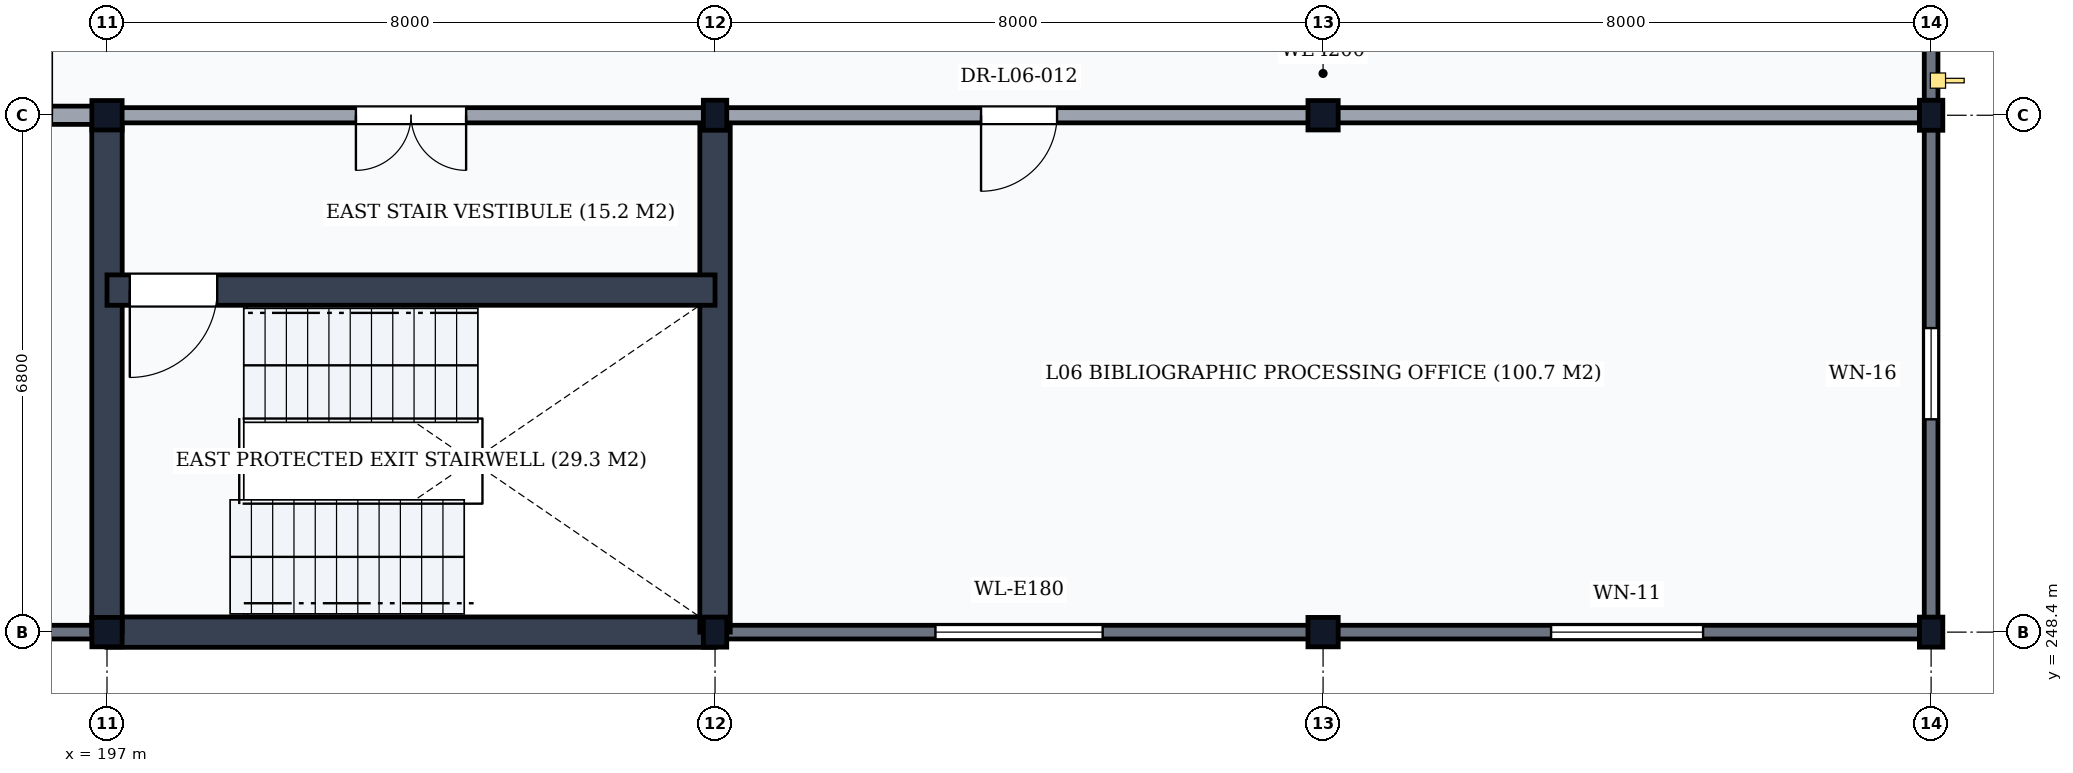
"""IFC4 building model, lengths in metres.
Left out: names, types, materials, properties, quantities, classifications, styles, units other than length and angle.
Written with IfcOpenShell. Run it as: python <this file> out.ifc"""

import sys

from ifc_helpers import new_model, si_unit, direction, frame, frame_2d, origin, origin_2d, place, context, subcontext, project, spatial, rectangle, i_section, extrude, element, fill, save


model = new_model("IFC4")
c1 = context("Model", 3, precision=1e-05, world=origin(), true_north=direction((0.0, 1.0)))
c2 = subcontext(c1, "Body", "Model", "MODEL_VIEW")
j1 = project(units=[si_unit("LENGTHUNIT", "METRE"), si_unit("PLANEANGLEUNIT", "RADIAN")], contexts=[c1])
p1 = place(None, origin())
s1 = spatial("IfcSite", under=j1, at=p1, CompositionType="ELEMENT")
p2 = place(p1, origin())
s2 = spatial("IfcBuilding", under=s1, at=p2, CompositionType="ELEMENT")
p3 = place(p2, frame((0.0, 0.0, 24.3)))
s3 = spatial("IfcBuildingStorey", under=s2, at=p3, CompositionType="ELEMENT", Elevation=24.3)
for number, where, z_axis, x_axis in (
    (1, (197.0, 248.4, 0.0), (0.0, 0.0, 1.0), (1.0, 0.0, 0.0)),
    (2, (197.0, 255.2, 0.0), (0.0, 0.0, 1.0), (1.0, 0.0, 0.0)),
):
    element("IfcColumn", number, at=place(p3, frame(where, z_axis=z_axis, x_axis=x_axis)), inside=s3, PredefinedType="COLUMN", context=c2, shape_type="SweptSolid", body=[
        extrude(i_section(OverallWidth=0.398, OverallDepth=0.387, WebThickness=0.021, FlangeThickness=0.033, FilletRadius=0.015, at=origin_2d()), origin(), (0.0, 0.0, 1.0), 3.9),
    ])
for number, where, z_axis, x_axis in (
    (3, (205.0, 248.4, 0.0), (0.0, 0.0, 1.0), (1.0, 0.0, 0.0)),
    (4, (205.0, 255.2, 0.0), (0.0, 0.0, 1.0), (1.0, 0.0, 0.0)),
):
    element("IfcColumn", number, at=place(p3, frame(where, z_axis=z_axis, x_axis=x_axis)), inside=s3, PredefinedType="COLUMN", context=c2, shape_type="SweptSolid", body=[
        extrude(i_section(OverallWidth=0.308, OverallDepth=0.395, WebThickness=0.021, FlangeThickness=0.04, FilletRadius=0.027, at=origin_2d()), origin(), (0.0, 0.0, 1.0), 3.9),
    ])
for number, where, z_axis, x_axis in (
    (5, (213.0, 248.4, 0.0), (0.0, 0.0, 1.0), (1.0, 0.0, 0.0)),
    (6, (213.0, 255.2, 0.0), (0.0, 0.0, 1.0), (1.0, 0.0, 0.0)),
):
    element("IfcColumn", number, at=place(p3, frame(where, z_axis=z_axis, x_axis=x_axis)), inside=s3, PredefinedType="COLUMN", context=c2, shape_type="SweptSolid", body=[
        extrude(i_section(OverallWidth=0.398, OverallDepth=0.387, WebThickness=0.021, FlangeThickness=0.033, FilletRadius=0.015, at=origin_2d()), origin(), (0.0, 0.0, 1.0), 3.9),
    ])
for number, where, z_axis, x_axis in (
    (7, (221.0, 248.4, 0.0), (0.0, 0.0, 1.0), (1.0, 0.0, 0.0)),
    (8, (221.0, 255.2, 0.0), (0.0, 0.0, 1.0), (1.0, 0.0, 0.0)),
):
    element("IfcColumn", number, at=place(p3, frame(where, z_axis=z_axis, x_axis=x_axis)), inside=s3, PredefinedType="COLUMN", context=c2, shape_type="SweptSolid", body=[
        extrude(i_section(OverallWidth=0.308, OverallDepth=0.395, WebThickness=0.021, FlangeThickness=0.04, FilletRadius=0.027, at=origin_2d()), origin(), (0.0, 0.0, 1.0), 3.9),
    ])
p4 = place(p3, frame((189.006, 248.4, 0.0), z_axis=(0.0, 0.0, 1.0), x_axis=(1.0, 0.0, 0.0)))
e9 = element("IfcWall", 9, at=p4, inside=s3, PredefinedType="SOLIDWALL", context=c2, shape_type="SweptSolid", body=[
    extrude(rectangle(XDim=7.988, YDim=0.18, at=frame_2d((3.994, 0.0))), origin(), (0.0, 0.0, 1.0), 3.348),
])
p5 = place(p3, frame((205.006, 248.4, 0.0), z_axis=(0.0, 0.0, 1.0), x_axis=(1.0, 0.0, 0.0)))
e10 = element("IfcWall", 10, at=p5, inside=s3, PredefinedType="SOLIDWALL", context=c2, shape_type="SweptSolid", body=[
    extrude(rectangle(XDim=7.988, YDim=0.18, at=frame_2d((3.994, 0.0))), origin(), (0.0, 0.0, 1.0), 3.348),
])
p6 = place(p5, frame((2.894, 0.0, 0.95)))
e11 = element("IfcOpeningElement", 11, at=p6, cuts=e10, PredefinedType="OPENING", context=c2, shape_type="SweptSolid", body=[
    extrude(rectangle(XDim=2.2, YDim=2.1, at=frame_2d((1.1, 1.05))), frame((0.0, 0.105, 0.0), z_axis=(0.0, -1.0, 0.0), x_axis=(1.0, 0.0, 0.0)), (0.0, 0.0, 1.0), 0.21),
])
p7 = place(p3, frame((213.006, 248.4, 0.0), z_axis=(0.0, 0.0, 1.0), x_axis=(1.0, 0.0, 0.0)))
e12 = element("IfcWall", 12, at=p7, inside=s3, PredefinedType="SOLIDWALL", context=c2, shape_type="SweptSolid", body=[
    extrude(rectangle(XDim=7.988, YDim=0.18, at=frame_2d((3.994, 0.0))), origin(), (0.0, 0.0, 1.0), 3.348),
])
p8 = place(p7, frame((2.994, 0.0, 0.95)))
e13 = element("IfcOpeningElement", 13, at=p8, cuts=e12, PredefinedType="OPENING", context=c2, shape_type="SweptSolid", body=[
    extrude(rectangle(XDim=2.0, YDim=2.1, at=frame_2d((1.0, 1.05))), frame((0.0, 0.105, 0.0), z_axis=(0.0, -1.0, 0.0), x_axis=(1.0, 0.0, 0.0)), (0.0, 0.0, 1.0), 0.21),
])
p9 = place(p3, frame((221.0, 248.406, 0.0), z_axis=(0.0, 0.0, 1.0), x_axis=(0.0, 1.0, 0.0)))
e14 = element("IfcWall", 14, at=p9, inside=s3, PredefinedType="SOLIDWALL", context=c2, shape_type="SweptSolid", body=[
    extrude(rectangle(XDim=6.788, YDim=0.18, at=frame_2d((3.394, 0.0))), origin(), (0.0, 0.0, 1.0), 3.428),
])
p10 = place(p9, frame((2.794, 0.0, 0.95)))
e15 = element("IfcOpeningElement", 15, at=p10, cuts=e14, PredefinedType="OPENING", context=c2, shape_type="SweptSolid", body=[
    extrude(rectangle(XDim=1.2, YDim=1.8, at=frame_2d((0.6, 0.9))), frame((0.0, 0.105, 0.0), z_axis=(0.0, -1.0, 0.0), x_axis=(1.0, 0.0, 0.0)), (0.0, 0.0, 1.0), 0.21),
])
p11 = place(p3, frame((221.0, 255.206, 0.0), z_axis=(0.0, 0.0, 1.0), x_axis=(0.0, 1.0, 0.0)))
e16 = element("IfcWall", 16, at=p11, inside=s3, PredefinedType="SOLIDWALL", context=c2, shape_type="SweptSolid", body=[
    extrude(rectangle(XDim=7.588, YDim=0.18, at=frame_2d((3.794, 0.0))), origin(), (0.0, 0.0, 1.0), 3.388),
])
p12 = place(p11, frame((3.866, 0.0, 0.95)))
e17 = element("IfcOpeningElement", 17, at=p12, cuts=e16, PredefinedType="OPENING", context=c2, shape_type="SweptSolid", body=[
    extrude(rectangle(XDim=2.4, YDim=2.2, at=frame_2d((1.2, 1.1))), frame((0.0, 0.105, 0.0), z_axis=(0.0, -1.0, 0.0), x_axis=(1.0, 0.0, 0.0)), (0.0, 0.0, 1.0), 0.21),
])
p13 = place(p3, frame((197.0, 248.4, 0.0), z_axis=(0.0, 0.0, 1.0), x_axis=(1.0, 0.0, 0.0)))
e18 = element("IfcWall", 18, at=p13, inside=s3, PredefinedType="SHEAR", context=c2, shape_type="SweptSolid", body=[
    extrude(rectangle(XDim=8.0, YDim=0.4, at=frame_2d((4.0, 0.0))), origin(), (0.0, 0.0, 1.0), 3.66),
])
for number, where, z_axis, x_axis in (
    (19, (197.0, 248.4, 0.0), (0.0, 0.0, 1.0), (0.0, 1.0, 0.0)),
    (20, (205.0, 248.4, 0.0), (0.0, 0.0, 1.0), (0.0, 1.0, 0.0)),
):
    element("IfcWall", number, at=place(p3, frame(where, z_axis=z_axis, x_axis=x_axis)), inside=s3, PredefinedType="SHEAR", context=c2, shape_type="SweptSolid", body=[
        extrude(rectangle(XDim=6.8, YDim=0.4, at=frame_2d((3.4, 0.0))), origin(), (0.0, 0.0, 1.0), 3.66),
    ])
p14 = place(p3, frame((197.0, 252.9, 0.0), z_axis=(0.0, 0.0, 1.0), x_axis=(1.0, 0.0, 0.0)))
e21 = element("IfcWall", 21, at=p14, inside=s3, PredefinedType="SHEAR", context=c2, shape_type="SweptSolid", body=[
    extrude(rectangle(XDim=8.0, YDim=0.4, at=frame_2d((4.0, 0.0))), origin(), (0.0, 0.0, 1.0), 3.66),
])
p15 = place(p14, frame((0.3, 0.0, 0.0)))
e22 = element("IfcOpeningElement", 22, at=p15, cuts=e21, PredefinedType="OPENING", context=c2, shape_type="SweptSolid", body=[
    extrude(rectangle(XDim=1.15, YDim=2.15, at=frame_2d((0.575, 1.075))), frame((0.0, 0.215, 0.0), z_axis=(0.0, -1.0, 0.0), x_axis=(1.0, 0.0, 0.0)), (0.0, 0.0, 1.0), 0.43),
])
p16 = place(p3, frame((197.0, 255.2, 0.0), z_axis=(0.0, 0.0, 1.0), x_axis=(1.0, 0.0, 0.0)))
e23 = element("IfcWall", 23, at=p16, inside=s3, PredefinedType="PARTITIONING", context=c2, shape_type="SweptSolid", body=[
    extrude(rectangle(XDim=8.0, YDim=0.2, at=frame_2d((4.0, 0.0))), origin(), (0.0, 0.0, 1.0), 3.058),
])
p17 = place(p16, frame((3.275, 0.0, 0.0)))
e24 = element("IfcOpeningElement", 24, at=p17, cuts=e23, PredefinedType="OPENING", context=c2, shape_type="SweptSolid", body=[
    extrude(rectangle(XDim=1.45, YDim=2.2, at=frame_2d((0.725, 1.1))), frame((0.0, 0.115, 0.0), z_axis=(0.0, -1.0, 0.0), x_axis=(1.0, 0.0, 0.0)), (0.0, 0.0, 1.0), 0.23),
])
p18 = place(p3, frame((189.0, 255.2, 0.0), z_axis=(0.0, 0.0, 1.0), x_axis=(1.0, 0.0, 0.0)))
e25 = element("IfcWall", 25, at=p18, inside=s3, PredefinedType="PARTITIONING", context=c2, shape_type="SweptSolid", body=[
    extrude(rectangle(XDim=8.0, YDim=0.24, at=frame_2d((4.0, 0.0))), origin(), (0.0, 0.0, 1.0), 3.058),
])
p19 = place(p18, frame((1.05, 0.0, 0.0)))
e26 = element("IfcOpeningElement", 26, at=p19, cuts=e25, PredefinedType="OPENING", context=c2, shape_type="SweptSolid", body=[
    extrude(rectangle(XDim=1.0, YDim=2.1, at=frame_2d((0.5, 1.05))), frame((0.0, 0.135, 0.0), z_axis=(0.0, -1.0, 0.0), x_axis=(1.0, 0.0, 0.0)), (0.0, 0.0, 1.0), 0.27),
])
p20 = place(p18, frame((3.6, 0.0, 0.0)))
e27 = element("IfcOpeningElement", 27, at=p20, cuts=e25, PredefinedType="OPENING", context=c2, shape_type="SweptSolid", body=[
    extrude(rectangle(XDim=1.5, YDim=2.25, at=frame_2d((0.75, 1.125))), frame((0.0, 0.135, 0.0), z_axis=(0.0, -1.0, 0.0), x_axis=(1.0, 0.0, 0.0)), (0.0, 0.0, 1.0), 0.27),
])
p21 = place(p18, frame((6.425, 0.0, 0.0)))
e28 = element("IfcOpeningElement", 28, at=p21, cuts=e25, PredefinedType="OPENING", context=c2, shape_type="SweptSolid", body=[
    extrude(rectangle(XDim=0.85, YDim=2.1, at=frame_2d((0.425, 1.05))), frame((0.0, 0.135, 0.0), z_axis=(0.0, -1.0, 0.0), x_axis=(1.0, 0.0, 0.0)), (0.0, 0.0, 1.0), 0.27),
])
p22 = place(p3, frame((205.0, 255.2, 0.0), z_axis=(0.0, 0.0, 1.0), x_axis=(1.0, 0.0, 0.0)))
e29 = element("IfcWall", 29, at=p22, inside=s3, PredefinedType="PARTITIONING", context=c2, shape_type="SweptSolid", body=[
    extrude(rectangle(XDim=16.0, YDim=0.2, at=frame_2d((8.0, 0.0))), origin(), (0.0, 0.0, 1.0), 3.058),
])
p23 = place(p22, frame((3.5, 0.0, 0.0)))
e30 = element("IfcOpeningElement", 30, at=p23, cuts=e29, PredefinedType="OPENING", context=c2, shape_type="SweptSolid", body=[
    extrude(rectangle(XDim=1.0, YDim=2.1, at=frame_2d((0.5, 1.05))), frame((0.0, 0.115, 0.0), z_axis=(0.0, -1.0, 0.0), x_axis=(1.0, 0.0, 0.0)), (0.0, 0.0, 1.0), 0.23),
])
p24 = place(p6, origin())
e31 = element("IfcWindow", 31, at=p24, inside=s3, PartitioningType="DOUBLE_PANEL_VERTICAL", PredefinedType="WINDOW", context=c2, shape_type="SweptSolid", body=[
    extrude(rectangle(XDim=2.2, YDim=2.1, at=frame_2d((1.1, 1.05))), frame((0.0, 0.03, 0.0), z_axis=(0.0, -1.0, 0.0), x_axis=(1.0, 0.0, 0.0)), (0.0, 0.0, 1.0), 0.06),
])
fill(e11, e31)
p25 = place(p8, origin())
e32 = element("IfcWindow", 32, at=p25, inside=s3, PartitioningType="DOUBLE_PANEL_VERTICAL", PredefinedType="WINDOW", context=c2, shape_type="SweptSolid", body=[
    extrude(rectangle(XDim=2.0, YDim=2.1, at=frame_2d((1.0, 1.05))), frame((0.0, 0.03, 0.0), z_axis=(0.0, -1.0, 0.0), x_axis=(1.0, 0.0, 0.0)), (0.0, 0.0, 1.0), 0.06),
])
fill(e13, e32)
p26 = place(p10, origin())
e33 = element("IfcWindow", 33, at=p26, inside=s3, PartitioningType="SINGLE_PANEL", PredefinedType="WINDOW", context=c2, shape_type="SweptSolid", body=[
    extrude(rectangle(XDim=1.2, YDim=1.8, at=frame_2d((0.6, 0.9))), frame((0.0, 0.03, 0.0), z_axis=(0.0, -1.0, 0.0), x_axis=(1.0, 0.0, 0.0)), (0.0, 0.0, 1.0), 0.06),
])
fill(e15, e33)
p27 = place(p15, frame((1.15, 0.0, 0.0), z_axis=(0.0, 0.0, 1.0), x_axis=(-1.0, 0.0, 0.0)))
e34 = element("IfcDoor", 34, at=p27, inside=s3, OperationType="SINGLE_SWING_RIGHT", PredefinedType="DOOR", context=c2, shape_type="SweptSolid", body=[
    extrude(rectangle(XDim=1.15, YDim=2.15, at=frame_2d((0.575, 1.075))), frame((0.0, 0.025, 0.0), z_axis=(0.0, -1.0, 0.0), x_axis=(1.0, 0.0, 0.0)), (0.0, 0.0, 1.0), 0.05),
])
fill(e22, e34)
p28 = place(p17, frame((1.45, 0.0, 0.0), z_axis=(0.0, 0.0, 1.0), x_axis=(-1.0, 0.0, 0.0)))
e35 = element("IfcDoor", 35, at=p28, inside=s3, OperationType="DOUBLE_DOOR_SINGLE_SWING", PredefinedType="DOOR", context=c2, shape_type="SweptSolid", body=[
    extrude(rectangle(XDim=1.45, YDim=2.2, at=frame_2d((0.725, 1.1))), frame((0.0, 0.025, 0.0), z_axis=(0.0, -1.0, 0.0), x_axis=(1.0, 0.0, 0.0)), (0.0, 0.0, 1.0), 0.05),
])
fill(e24, e35)
p29 = place(p23, frame((1.0, 0.0, 0.0), z_axis=(0.0, 0.0, 1.0), x_axis=(-1.0, 0.0, 0.0)))
e36 = element("IfcDoor", 36, at=p29, inside=s3, OperationType="SINGLE_SWING_RIGHT", PredefinedType="DOOR", context=c2, shape_type="SweptSolid", body=[
    extrude(rectangle(XDim=1.0, YDim=2.1, at=frame_2d((0.5, 1.05))), frame((0.0, 0.025, 0.0), z_axis=(0.0, -1.0, 0.0), x_axis=(1.0, 0.0, 0.0)), (0.0, 0.0, 1.0), 0.05),
])
fill(e30, e36)
save(model, sys.argv[1])
